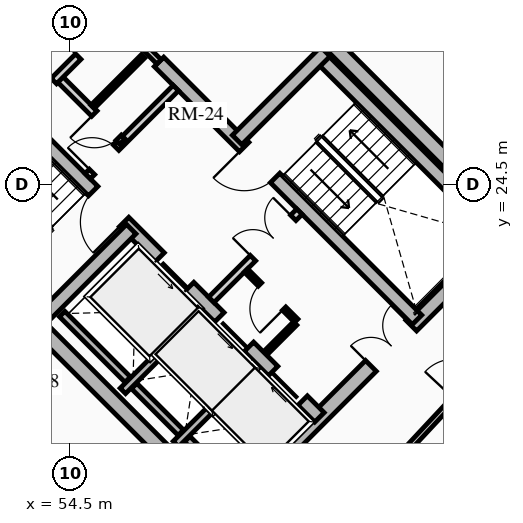
"""IFC4 building model, lengths in metres.
Left out: names, types, materials, properties, quantities, classifications, styles, units other than length and angle.
Written with IfcOpenShell. Run it as: python <this file> out.ifc"""

import sys

from ifc_helpers import new_model, si_unit, direction, frame, frame_2d, origin, place, context, subcontext, project, spatial, rectangle, extrude, source, transform, mapped, element, fill, save


model = new_model("IFC4")
c1 = context("Model", 3, precision=1e-05, world=origin(), true_north=direction((0.0, 1.0)))
c2 = subcontext(c1, "Body", "Model", "MODEL_VIEW")
j1 = project(units=[si_unit("LENGTHUNIT", "METRE"), si_unit("PLANEANGLEUNIT", "RADIAN")], contexts=[c1])
p1 = place(None, origin())
s1 = spatial("IfcSite", under=j1, at=p1, CompositionType="ELEMENT")
p2 = place(p1, origin())
s2 = spatial("IfcBuilding", under=s1, at=p2, CompositionType="ELEMENT")
p3 = place(p2, frame((0.0, 0.0, 169.06)))
s3 = spatial("IfcBuildingStorey", under=s2, at=p3, CompositionType="ELEMENT", Elevation=169.06)
for number, where, z_axis, x_axis in (
    (1, (58.702, 15.732, 0.0), (0.0, 0.0, 1.0), (-0.707, 0.707, 0.0)),
    (2, (66.268, 23.298, 0.0), (0.0, 0.0, 1.0), (-0.707, 0.707, 0.0)),
):
    element("IfcWall", number, at=place(p3, frame(where, z_axis=z_axis, x_axis=x_axis)), inside=s3, PredefinedType="SHEAR", context=c2, shape_type="SweptSolid", body=[
        extrude(rectangle(XDim=14.1, YDim=0.4, at=frame_2d((7.05, 0.0))), origin(), (0.0, 0.0, 1.0), 2.91),
    ])
p4 = place(p3, frame((58.561, 15.873, 0.0), z_axis=(0.0, 0.0, 1.0), x_axis=(0.707106781187, 0.707106781187, 0.0)))
e3 = element("IfcWall", 3, at=p4, inside=s3, PredefinedType="SHEAR", context=c2, shape_type="SweptSolid", body=[
    extrude(rectangle(XDim=10.7, YDim=0.4, at=frame_2d((5.35, 0.0))), origin(), (0.0, 0.0, 1.0), 2.91),
])
m1 = source(origin(), c2, "Body", "SweptSolid", [
    extrude(rectangle(XDim=1.5, YDim=2.02, at=frame_2d((0.75, 1.01))), frame((0.0, 0.21, 0.0), z_axis=(0.0, -1.0, 0.0), x_axis=(1.0, 0.0, 0.0)), (0.0, 0.0, 1.0), 0.42),
])
p5 = place(p4, frame((5.45, 0.0, 0.0)))
e4 = element("IfcOpeningElement", 4, at=p5, cuts=e3, PredefinedType="OPENING", context=c2, shape_type="MappedRepresentation", body=[
    mapped(m1, transform((0.0, 0.0, 0.0), x_axis=(1.0, 0.0, 0.0), y_axis=(0.0, 1.0, 0.0), z_axis=(0.0, 0.0, 1.0), scale=1.0)),
])
p6 = place(p3, frame((48.873, 25.561, 0.0), z_axis=(0.0, 0.0, 1.0), x_axis=(0.707106781187, 0.707106781187, 0.0)))
e5 = element("IfcWall", 5, at=p6, inside=s3, PredefinedType="SHEAR", context=c2, shape_type="SweptSolid", body=[
    extrude(rectangle(XDim=10.7, YDim=0.4, at=frame_2d((5.35, 0.0))), origin(), (0.0, 0.0, 1.0), 2.91),
])
p7 = place(p6, frame((4.6, 0.0, 0.0)))
e6 = element("IfcOpeningElement", 6, at=p7, cuts=e5, PredefinedType="OPENING", context=c2, shape_type="MappedRepresentation", body=[
    mapped(m1, transform((0.0, 0.0, 0.0), x_axis=(1.0, 0.0, 0.0), y_axis=(0.0, 1.0, 0.0), z_axis=(0.0, 0.0, 1.0), scale=1.0)),
])
p8 = place(p3, frame((61.06, 18.373, 0.0), z_axis=(0.0, 0.0, 1.0), x_axis=(-0.707106781187, 0.707106781187, 0.0)))
e7 = element("IfcWall", 7, at=p8, inside=s3, PredefinedType="SHEAR", context=c2, shape_type="SweptSolid", body=[
    extrude(rectangle(XDim=13.7, YDim=0.35, at=frame_2d((6.85, 0.0))), origin(), (0.0, 0.0, 1.0), 2.91),
])
m2 = source(origin(), c2, "Body", "SweptSolid", [
    extrude(rectangle(XDim=1.1, YDim=2.015, at=frame_2d((0.55, 1.007))), frame((0.0, 0.185, 0.0), z_axis=(0.0, -1.0, 0.0), x_axis=(1.0, 0.0, 0.0)), (0.0, 0.0, 1.0), 0.37),
])
p9 = place(p8, frame((4.85, 0.0, 0.0)))
e8 = element("IfcOpeningElement", 8, at=p9, cuts=e7, PredefinedType="OPENING", context=c2, shape_type="MappedRepresentation", body=[
    mapped(m2, transform((0.0, 0.0, 0.0), x_axis=(1.0, 0.0, 0.0), y_axis=(0.0, 1.0, 0.0), z_axis=(0.0, 0.0, 1.0), scale=1.0)),
])
p10 = place(p8, frame((0.625, 0.0, 0.0)))
e9 = element("IfcOpeningElement", 9, at=p10, cuts=e7, PredefinedType="OPENING", context=c2, shape_type="MappedRepresentation", body=[
    mapped(m2, transform((0.0, 0.0, 0.0), x_axis=(1.0, 0.0, 0.0), y_axis=(0.0, 1.0, 0.0), z_axis=(0.0, 0.0, 1.0), scale=1.0)),
])
p11 = place(p8, frame((2.625, 0.0, 0.0)))
e10 = element("IfcOpeningElement", 10, at=p11, cuts=e7, PredefinedType="OPENING", context=c2, shape_type="MappedRepresentation", body=[
    mapped(m2, transform((0.0, 0.0, 0.0), x_axis=(1.0, 0.0, 0.0), y_axis=(0.0, 1.0, 0.0), z_axis=(0.0, 0.0, 1.0), scale=1.0)),
])
m3 = source(origin(), c2, "Body", "SweptSolid", [
    extrude(rectangle(XDim=1.15, YDim=2.02, at=frame_2d((0.575, 1.01))), frame((0.0, 0.185, 0.0), z_axis=(0.0, -1.0, 0.0), x_axis=(1.0, 0.0, 0.0)), (0.0, 0.0, 1.0), 0.37),
])
p12 = place(p8, frame((7.27, 0.0, 0.0)))
e11 = element("IfcOpeningElement", 11, at=p12, cuts=e7, PredefinedType="OPENING", context=c2, shape_type="MappedRepresentation", body=[
    mapped(m3, transform((0.0, 0.0, 0.0), x_axis=(1.0, 0.0, 0.0), y_axis=(0.0, 1.0, 0.0), z_axis=(0.0, 0.0, 1.0), scale=1.0)),
])
p13 = place(p3, frame((63.627, 20.94, 0.0), z_axis=(0.0, 0.0, 1.0), x_axis=(-0.707119496762, 0.707094065383, 0.0)))
e12 = element("IfcWall", 12, at=p13, inside=s3, PredefinedType="SHEAR", context=c2, shape_type="SweptSolid", body=[
    extrude(rectangle(XDim=9.6, YDim=0.35, at=frame_2d((4.8, 0.0))), origin(), (0.0, 0.0, 1.0), 2.91),
])
p14 = place(p13, frame((5.28, 0.0, 0.0)))
e13 = element("IfcOpeningElement", 13, at=p14, cuts=e12, PredefinedType="OPENING", context=c2, shape_type="MappedRepresentation", body=[
    mapped(m3, transform((0.0, 0.0, 0.0), x_axis=(1.0, 0.0, 0.0), y_axis=(0.0, 1.0, 0.0), z_axis=(0.0, 0.0, 1.0), scale=1.0)),
])
p15 = place(p3, frame((53.922, 21.141, 0.0), z_axis=(0.0, 0.0, 1.0), x_axis=(-0.707106781187, 0.707106781187, 0.0)))
e14 = element("IfcWall", 14, at=p15, inside=s3, PredefinedType="SHEAR", context=c2, shape_type="SweptSolid", body=[
    extrude(rectangle(XDim=6.695, YDim=0.35, at=frame_2d((3.348, 0.0))), origin(), (0.0, 0.0, 1.0), 2.91),
])
p16 = place(p3, frame((53.784, 21.003, 0.0), z_axis=(0.0, 0.0, 1.0), x_axis=(0.707106781187, 0.707106781187, 0.0)))
e15 = element("IfcWall", 15, at=p16, inside=s3, PredefinedType="SHEAR", context=c2, shape_type="SweptSolid", body=[
    extrude(rectangle(XDim=3.285, YDim=0.35, at=frame_2d((1.643, 0.0))), origin(), (0.0, 0.0, 1.0), 2.91),
])
p17 = place(p3, frame((65.812, 23.125, 0.0), z_axis=(0.0, 0.0, 1.0), x_axis=(-0.707106781187, 0.707106781187, 0.0)))
e16 = element("IfcWall", 16, at=p17, inside=s3, PredefinedType="SHEAR", context=c2, shape_type="SweptSolid", body=[
    extrude(rectangle(XDim=6.695, YDim=0.35, at=frame_2d((3.348, 0.0))), origin(), (0.0, 0.0, 1.0), 2.91),
])
p18 = place(p3, frame((58.893, 25.674, 0.0), z_axis=(0.0, 0.0, 1.0), x_axis=(0.707106781187, 0.707106781187, 0.0)))
e17 = element("IfcWall", 17, at=p18, inside=s3, PredefinedType="SHEAR", context=c2, shape_type="SweptSolid", body=[
    extrude(rectangle(XDim=3.285, YDim=0.35, at=frame_2d((1.643, 0.0))), origin(), (0.0, 0.0, 1.0), 2.91),
])
p19 = place(p3, frame((55.888, 19.069, 0.0), z_axis=(0.0, 0.0, 1.0), x_axis=(0.707106781187, 0.707106781187, 0.0)))
e18 = element("IfcWall", 18, at=p19, inside=s3, PredefinedType="SHEAR", context=c2, shape_type="SweptSolid", body=[
    extrude(rectangle(XDim=2.97, YDim=0.2, at=frame_2d((1.485, 0.0))), origin(), (0.0, 0.0, 1.0), 2.91),
])
p20 = place(p3, frame((56.015, 19.366, 0.0), z_axis=(0.0, 0.0, 1.0), x_axis=(-0.707106781187, 0.707106781187, 0.0)))
e19 = element("IfcWall", 19, at=p20, inside=s3, PredefinedType="SHEAR", context=c2, shape_type="SweptSolid", body=[
    extrude(rectangle(XDim=2.44, YDim=0.2, at=frame_2d((1.22, 0.0))), origin(), (0.0, 0.0, 1.0), 2.91),
])
p21 = place(p3, frame((57.284, 17.673, 0.0), z_axis=(0.0, 0.0, 1.0), x_axis=(0.707147878904, 0.70706568108, 0.0)))
e20 = element("IfcWall", 20, at=p21, inside=s3, PredefinedType="SHEAR", context=c2, shape_type="SweptSolid", body=[
    extrude(rectangle(XDim=2.97, YDim=0.2, at=frame_2d((1.485, 0.0))), origin(), (0.0, 0.0, 1.0), 2.91),
])
p22 = place(p3, frame((57.412, 17.97, 0.0), z_axis=(0.0, 0.0, 1.0), x_axis=(-0.707106781187, 0.707106781187, 0.0)))
e21 = element("IfcWall", 21, at=p22, inside=s3, PredefinedType="SHEAR", context=c2, shape_type="SweptSolid", body=[
    extrude(rectangle(XDim=1.735, YDim=0.2, at=frame_2d((0.867, 0.0))), origin(), (0.0, 0.0, 1.0), 2.91),
])
p23 = place(p3, frame((58.737, 16.644, 0.0), z_axis=(0.0, 0.0, 1.0), x_axis=(-0.707032117043, 0.707181437447, 0.0)))
e22 = element("IfcWall", 22, at=p23, inside=s3, PredefinedType="SHEAR", context=c2, shape_type="SweptSolid", body=[
    extrude(rectangle(XDim=1.635, YDim=0.2, at=frame_2d((0.817, 0.0))), origin(), (0.0, 0.0, 1.0), 2.91),
])
p24 = place(p3, frame((58.214, 21.467, 0.0), z_axis=(0.0, 0.0, 1.0), x_axis=(0.707106781187, 0.707106781187, 0.0)))
e23 = element("IfcWall", 23, at=p24, inside=s3, PredefinedType="PARTITIONING", context=c2, shape_type="SweptSolid", body=[
    extrude(rectangle(XDim=3.28, YDim=0.2, at=frame_2d((1.64, 0.0))), origin(), (0.0, 0.0, 1.0), 2.675),
])
m4 = source(origin(), c2, "Body", "SweptSolid", [
    extrude(rectangle(XDim=1.5, YDim=2.02, at=frame_2d((0.75, 1.01))), frame((0.0, 0.11, 0.0), z_axis=(0.0, -1.0, 0.0), x_axis=(1.0, 0.0, 0.0)), (0.0, 0.0, 1.0), 0.22),
])
p25 = place(p24, frame((1.55, 0.0, 0.0)))
e24 = element("IfcOpeningElement", 24, at=p25, cuts=e23, PredefinedType="OPENING", context=c2, shape_type="MappedRepresentation", body=[
    mapped(m4, transform((0.0, 0.0, 0.0), x_axis=(1.0, 0.0, 0.0), y_axis=(0.0, 1.0, 0.0), z_axis=(0.0, 0.0, 1.0), scale=1.0)),
])
p26 = place(p3, frame((54.961, 24.719, 0.0), z_axis=(0.0, 0.0, 1.0), x_axis=(0.707106781187, 0.707106781187, 0.0)))
e25 = element("IfcWall", 25, at=p26, inside=s3, PredefinedType="PARTITIONING", context=c2, shape_type="SweptSolid", body=[
    extrude(rectangle(XDim=3.28, YDim=0.2, at=frame_2d((1.64, 0.0))), origin(), (0.0, 0.0, 1.0), 2.675),
])
m5 = source(origin(), c2, "Body", "SweptSolid", [
    extrude(rectangle(XDim=0.9, YDim=2.005, at=frame_2d((0.45, 1.002))), frame((0.0, 0.11, 0.0), z_axis=(0.0, -1.0, 0.0), x_axis=(1.0, 0.0, 0.0)), (0.0, 0.0, 1.0), 0.22),
])
p27 = place(p26, frame((0.16, 0.0, 0.0)))
e26 = element("IfcOpeningElement", 26, at=p27, cuts=e25, PredefinedType="OPENING", context=c2, shape_type="MappedRepresentation", body=[
    mapped(m5, transform((0.0, 0.0, 0.0), x_axis=(1.0, 0.0, 0.0), y_axis=(0.0, 1.0, 0.0), z_axis=(0.0, 0.0, 1.0), scale=1.0)),
])
p28 = place(p3, frame((55.874, 25.631, 0.0), z_axis=(0.0, 0.0, 1.0), x_axis=(-0.707157639372, 0.707055919343, 0.0)))
e27 = element("IfcWall", 27, at=p28, inside=s3, PredefinedType="PARTITIONING", context=c2, shape_type="SweptSolid", body=[
    extrude(rectangle(XDim=2.4, YDim=0.2, at=frame_2d((1.2, 0.0))), origin(), (0.0, 0.0, 1.0), 2.675),
])
p29 = place(p28, frame((0.14, 0.0, 0.0)))
e28 = element("IfcOpeningElement", 28, at=p29, cuts=e27, PredefinedType="OPENING", context=c2, shape_type="MappedRepresentation", body=[
    mapped(m5, transform((0.0, 0.0, 0.0), x_axis=(1.0, 0.0, 0.0), y_axis=(0.0, 1.0, 0.0), z_axis=(0.0, 0.0, 1.0), scale=1.0)),
])
p30 = place(p3, frame((53.264, 26.416, 0.0), z_axis=(0.0, 0.0, 1.0), x_axis=(0.707106781187, 0.707106781187, 0.0)))
e29 = element("IfcWall", 29, at=p30, inside=s3, PredefinedType="PARTITIONING", context=c2, shape_type="SweptSolid", body=[
    extrude(rectangle(XDim=3.28, YDim=0.2, at=frame_2d((1.64, 0.0))), origin(), (0.0, 0.0, 1.0), 2.675),
])
m6 = source(origin(), c2, "Body", "SweptSolid", [
    extrude(rectangle(XDim=1.0, YDim=2.015, at=frame_2d((0.5, 1.007))), frame((0.0, 0.11, 0.0), z_axis=(0.0, -1.0, 0.0), x_axis=(1.0, 0.0, 0.0)), (0.0, 0.0, 1.0), 0.22),
])
p31 = place(p30, frame((0.14, 0.0, 0.0)))
e30 = element("IfcOpeningElement", 30, at=p31, cuts=e29, PredefinedType="OPENING", context=c2, shape_type="MappedRepresentation", body=[
    mapped(m6, transform((0.0, 0.0, 0.0), x_axis=(1.0, 0.0, 0.0), y_axis=(0.0, 1.0, 0.0), z_axis=(0.0, 0.0, 1.0), scale=1.0)),
])
p32 = place(p30, frame((2.05, 0.0, 0.0)))
e31 = element("IfcOpeningElement", 31, at=p32, cuts=e29, PredefinedType="OPENING", context=c2, shape_type="MappedRepresentation", body=[
    mapped(m5, transform((0.0, 0.0, 0.0), x_axis=(1.0, 0.0, 0.0), y_axis=(0.0, 1.0, 0.0), z_axis=(0.0, 0.0, 1.0), scale=1.0)),
])
p33 = place(p3, frame((60.448, 20.915, 0.0), z_axis=(0.0, 0.0, 1.0), x_axis=(-0.707106781187, 0.707106781187, 0.0)))
e32 = element("IfcWall", 32, at=p33, inside=s3, PredefinedType="PARTITIONING", context=c2, shape_type="SweptSolid", body=[
    extrude(rectangle(XDim=1.87, YDim=0.125, at=frame_2d((0.935, 0.0))), origin(), (0.0, 0.0, 1.0), 2.675),
])
m7 = source(origin(), c2, "Body", "SweptSolid", [
    extrude(rectangle(XDim=0.9, YDim=2.005, at=frame_2d((0.45, 1.002))), frame((0.0, 0.073, 0.0), z_axis=(0.0, -1.0, 0.0), x_axis=(1.0, 0.0, 0.0)), (0.0, 0.0, 1.0), 0.145),
])
p34 = place(p33, frame((0.45, 0.0, 0.0)))
e33 = element("IfcOpeningElement", 33, at=p34, cuts=e32, PredefinedType="OPENING", context=c2, shape_type="MappedRepresentation", body=[
    mapped(m7, transform((0.0, 0.0, 0.0), x_axis=(1.0, 0.0, 0.0), y_axis=(0.0, 1.0, 0.0), z_axis=(0.0, 0.0, 1.0), scale=1.0)),
])
p35 = place(p3, frame((59.643, 20.066, 0.0), z_axis=(0.0, 0.0, 1.0), x_axis=(0.707106781187, 0.707106781187, 0.0)))
e34 = element("IfcWall", 34, at=p35, inside=s3, PredefinedType="PARTITIONING", context=c2, shape_type="SweptSolid", body=[
    extrude(rectangle(XDim=1.1, YDim=0.125, at=frame_2d((0.55, 0.0))), origin(), (0.0, 0.0, 1.0), 2.675),
])
p36 = place(p3, frame((55.089, 26.543, 0.0), z_axis=(0.0, 0.0, 1.0), x_axis=(0.707106781187, 0.707106781187, 0.0)))
e35 = element("IfcWall", 35, at=p36, inside=s3, PredefinedType="PARTITIONING", context=c2, shape_type="SweptSolid", body=[
    extrude(rectangle(XDim=1.88, YDim=0.125, at=frame_2d((0.94, 0.0))), origin(), (0.0, 0.0, 1.0), 2.675),
])
p37 = place(p3, frame((56.839, 27.728, 0.0), z_axis=(0.0, 0.0, 1.0), x_axis=(-0.707106781187, 0.707106781187, 0.0)))
e36 = element("IfcWall", 36, at=p37, inside=s3, PredefinedType="PARTITIONING", context=c2, shape_type="SweptSolid", body=[
    extrude(rectangle(XDim=3.9, YDim=0.16, at=frame_2d((1.95, 0.0))), origin(), (0.0, 0.0, 1.0), 2.675),
])
m8 = source(origin(), c2, "Body", "SweptSolid", [
    extrude(rectangle(XDim=0.9, YDim=2.005, at=frame_2d((0.45, 1.002))), frame((0.0, 0.09, 0.0), z_axis=(0.0, -1.0, 0.0), x_axis=(1.0, 0.0, 0.0)), (0.0, 0.0, 1.0), 0.18),
])
p38 = place(p37, frame((2.2, 0.0, 0.0)))
e37 = element("IfcOpeningElement", 37, at=p38, cuts=e36, PredefinedType="OPENING", context=c2, shape_type="MappedRepresentation", body=[
    mapped(m8, transform((0.0, 0.0, 0.0), x_axis=(1.0, 0.0, 0.0), y_axis=(0.0, 1.0, 0.0), z_axis=(0.0, 0.0, 1.0), scale=1.0)),
])
p39 = place(p3, frame((52.055, 19.055, 0.0), z_axis=(0.0, 0.0, 1.0), x_axis=(0.699249850691, -0.714877364524, 0.0)))
e38 = element("IfcWall", 38, at=p39, inside=s3, PredefinedType="PARTITIONING", context=c2, shape_type="SweptSolid", body=[
    extrude(rectangle(XDim=5.999, YDim=0.15, at=frame_2d((3.0, 0.0))), origin(), (0.0, 0.0, 1.0), 2.245),
])
p40 = place(p3, frame((62.756, 16.873, 0.0), z_axis=(0.0, 0.0, 1.0), x_axis=(0.682136885079, 0.73122450042, 0.0)))
e39 = element("IfcWall", 39, at=p40, inside=s3, PredefinedType="PARTITIONING", context=c2, shape_type="SweptSolid", body=[
    extrude(rectangle(XDim=6.476, YDim=0.15, at=frame_2d((3.238, 0.0))), origin(), (0.0, 0.0, 1.0), 2.245),
])
m9 = source(origin(), c2, "Body", "SweptSolid", [
    extrude(rectangle(XDim=1.05, YDim=2.015, at=frame_2d((0.525, 1.007))), frame((0.0, 0.085, 0.0), z_axis=(0.0, -1.0, 0.0), x_axis=(1.0, 0.0, 0.0)), (0.0, 0.0, 1.0), 0.17),
])
p41 = place(p40, frame((2.713, 0.0, 0.0)))
e40 = element("IfcOpeningElement", 40, at=p41, cuts=e39, PredefinedType="OPENING", context=c2, shape_type="MappedRepresentation", body=[
    mapped(m9, transform((0.0, 0.0, 0.0), x_axis=(1.0, 0.0, 0.0), y_axis=(0.0, 1.0, 0.0), z_axis=(0.0, 0.0, 1.0), scale=1.0)),
])
p42 = place(p3, frame((50.905, 17.905, 0.0), z_axis=(0.0, 0.0, 1.0), x_axis=(0.723816902075, -0.689992095803, 0.0)))
e41 = element("IfcWall", 41, at=p42, inside=s3, PredefinedType="PARTITIONING", context=c2, shape_type="SweptSolid", body=[
    extrude(rectangle(XDim=5.753, YDim=0.125, at=frame_2d((2.876, 0.0))), origin(), (0.0, 0.0, 1.0), 2.245),
])
p43 = place(p42, frame((2.426, 0.0, 0.0)))
e42 = element("IfcOpeningElement", 42, at=p43, cuts=e41, PredefinedType="OPENING", context=c2, shape_type="MappedRepresentation", body=[
    mapped(m7, transform((0.0, 0.0, 0.0), x_axis=(1.0, 0.0, 0.0), y_axis=(0.0, 1.0, 0.0), z_axis=(0.0, 0.0, 1.0), scale=1.0)),
])
m10 = source(origin(), c2, "Body", "SweptSolid", [
    extrude(rectangle(XDim=1.1, YDim=2.015, at=frame_2d((0.55, 1.007))), frame((0.0, 0.025, 0.0), z_axis=(0.0, -1.0, 0.0), x_axis=(1.0, 0.0, 0.0)), (0.0, 0.0, 1.0), 0.05),
])
p44 = place(p9, origin())
e43 = element("IfcDoor", 43, at=p44, inside=s3, OperationType="SLIDING_TO_LEFT", PredefinedType="DOOR", context=c2, shape_type="MappedRepresentation", body=[
    mapped(m10, transform((0.0, 0.0, 0.0), x_axis=(1.0, 0.0, 0.0), y_axis=(0.0, 1.0, 0.0), z_axis=(0.0, 0.0, 1.0), scale=1.0)),
])
fill(e8, e43)
p45 = place(p10, origin())
e44 = element("IfcDoor", 44, at=p45, inside=s3, OperationType="SLIDING_TO_RIGHT", PredefinedType="DOOR", context=c2, shape_type="MappedRepresentation", body=[
    mapped(m10, transform((0.0, 0.0, 0.0), x_axis=(1.0, 0.0, 0.0), y_axis=(0.0, 1.0, 0.0), z_axis=(0.0, 0.0, 1.0), scale=1.0)),
])
fill(e9, e44)
p46 = place(p11, origin())
e45 = element("IfcDoor", 45, at=p46, inside=s3, OperationType="SLIDING_TO_LEFT", PredefinedType="DOOR", context=c2, shape_type="MappedRepresentation", body=[
    mapped(m10, transform((0.0, 0.0, 0.0), x_axis=(1.0, 0.0, 0.0), y_axis=(0.0, 1.0, 0.0), z_axis=(0.0, 0.0, 1.0), scale=1.0)),
])
fill(e10, e45)
m11 = source(origin(), c2, "Body", "SweptSolid", [
    extrude(rectangle(XDim=1.15, YDim=2.02, at=frame_2d((0.575, 1.01))), frame((0.0, 0.025, 0.0), z_axis=(0.0, -1.0, 0.0), x_axis=(1.0, 0.0, 0.0)), (0.0, 0.0, 1.0), 0.05),
])
p47 = place(p12, origin())
e46 = element("IfcDoor", 46, at=p47, inside=s3, OperationType="SINGLE_SWING_LEFT", PredefinedType="DOOR", context=c2, shape_type="MappedRepresentation", body=[
    mapped(m11, transform((0.0, 0.0, 0.0), x_axis=(1.0, 0.0, 0.0), y_axis=(0.0, 1.0, 0.0), z_axis=(0.0, 0.0, 1.0), scale=1.0)),
])
fill(e11, e46)
p48 = place(p14, origin())
e47 = element("IfcDoor", 47, at=p48, inside=s3, OperationType="SINGLE_SWING_RIGHT", PredefinedType="DOOR", context=c2, shape_type="MappedRepresentation", body=[
    mapped(m11, transform((0.0, 0.0, 0.0), x_axis=(1.0, 0.0, 0.0), y_axis=(0.0, 1.0, 0.0), z_axis=(0.0, 0.0, 1.0), scale=1.0)),
])
fill(e13, e47)
m12 = source(origin(), c2, "Body", "SweptSolid", [
    extrude(rectangle(XDim=1.5, YDim=2.02, at=frame_2d((0.75, 1.01))), frame((0.0, 0.025, 0.0), z_axis=(0.0, -1.0, 0.0), x_axis=(1.0, 0.0, 0.0)), (0.0, 0.0, 1.0), 0.05),
])
p49 = place(p5, origin())
e48 = element("IfcDoor", 48, at=p49, inside=s3, OperationType="DOUBLE_DOOR_SINGLE_SWING", PredefinedType="DOOR", context=c2, shape_type="MappedRepresentation", body=[
    mapped(m12, transform((0.0, 0.0, 0.0), x_axis=(1.0, 0.0, 0.0), y_axis=(0.0, 1.0, 0.0), z_axis=(0.0, 0.0, 1.0), scale=1.0)),
])
fill(e4, e48)
p50 = place(p25, origin())
e49 = element("IfcDoor", 49, at=p50, inside=s3, OperationType="DOUBLE_DOOR_SINGLE_SWING", PredefinedType="DOOR", context=c2, shape_type="MappedRepresentation", body=[
    mapped(m12, transform((0.0, 0.0, 0.0), x_axis=(1.0, 0.0, 0.0), y_axis=(0.0, 1.0, 0.0), z_axis=(0.0, 0.0, 1.0), scale=1.0)),
])
fill(e24, e49)
m13 = source(origin(), c2, "Body", "SweptSolid", [
    extrude(rectangle(XDim=0.9, YDim=2.005, at=frame_2d((0.45, 1.002))), frame((0.0, 0.025, 0.0), z_axis=(0.0, -1.0, 0.0), x_axis=(1.0, 0.0, 0.0)), (0.0, 0.0, 1.0), 0.05),
])
p51 = place(p27, origin())
e50 = element("IfcDoor", 50, at=p51, inside=s3, OperationType="SINGLE_SWING_LEFT", PredefinedType="DOOR", context=c2, shape_type="MappedRepresentation", body=[
    mapped(m13, transform((0.0, 0.0, 0.0), x_axis=(1.0, 0.0, 0.0), y_axis=(0.0, 1.0, 0.0), z_axis=(0.0, 0.0, 1.0), scale=1.0)),
])
fill(e26, e50)
m14 = source(origin(), c2, "Body", "SweptSolid", [
    extrude(rectangle(XDim=1.0, YDim=2.015, at=frame_2d((0.5, 1.007))), frame((0.0, 0.025, 0.0), z_axis=(0.0, -1.0, 0.0), x_axis=(1.0, 0.0, 0.0)), (0.0, 0.0, 1.0), 0.05),
])
p52 = place(p31, origin())
e51 = element("IfcDoor", 51, at=p52, inside=s3, OperationType="SINGLE_SWING_RIGHT", PredefinedType="DOOR", context=c2, shape_type="MappedRepresentation", body=[
    mapped(m14, transform((0.0, 0.0, 0.0), x_axis=(1.0, 0.0, 0.0), y_axis=(0.0, 1.0, 0.0), z_axis=(0.0, 0.0, 1.0), scale=1.0)),
])
fill(e30, e51)
p53 = place(p34, origin())
e52 = element("IfcDoor", 52, at=p53, inside=s3, OperationType="SINGLE_SWING_LEFT", PredefinedType="DOOR", context=c2, shape_type="MappedRepresentation", body=[
    mapped(m13, transform((0.0, 0.0, 0.0), x_axis=(1.0, 0.0, 0.0), y_axis=(0.0, 1.0, 0.0), z_axis=(0.0, 0.0, 1.0), scale=1.0)),
])
fill(e33, e52)
p54 = place(p29, origin())
e53 = element("IfcDoor", 53, at=p54, inside=s3, OperationType="SINGLE_SWING_RIGHT", PredefinedType="DOOR", context=c2, shape_type="MappedRepresentation", body=[
    mapped(m13, transform((0.0, 0.0, 0.0), x_axis=(1.0, 0.0, 0.0), y_axis=(0.0, 1.0, 0.0), z_axis=(0.0, 0.0, 1.0), scale=1.0)),
])
fill(e28, e53)
p55 = place(p32, origin())
e54 = element("IfcDoor", 54, at=p55, inside=s3, OperationType="SINGLE_SWING_LEFT", PredefinedType="DOOR", context=c2, shape_type="MappedRepresentation", body=[
    mapped(m13, transform((0.0, 0.0, 0.0), x_axis=(1.0, 0.0, 0.0), y_axis=(0.0, 1.0, 0.0), z_axis=(0.0, 0.0, 1.0), scale=1.0)),
])
fill(e31, e54)
save(model, sys.argv[1])
